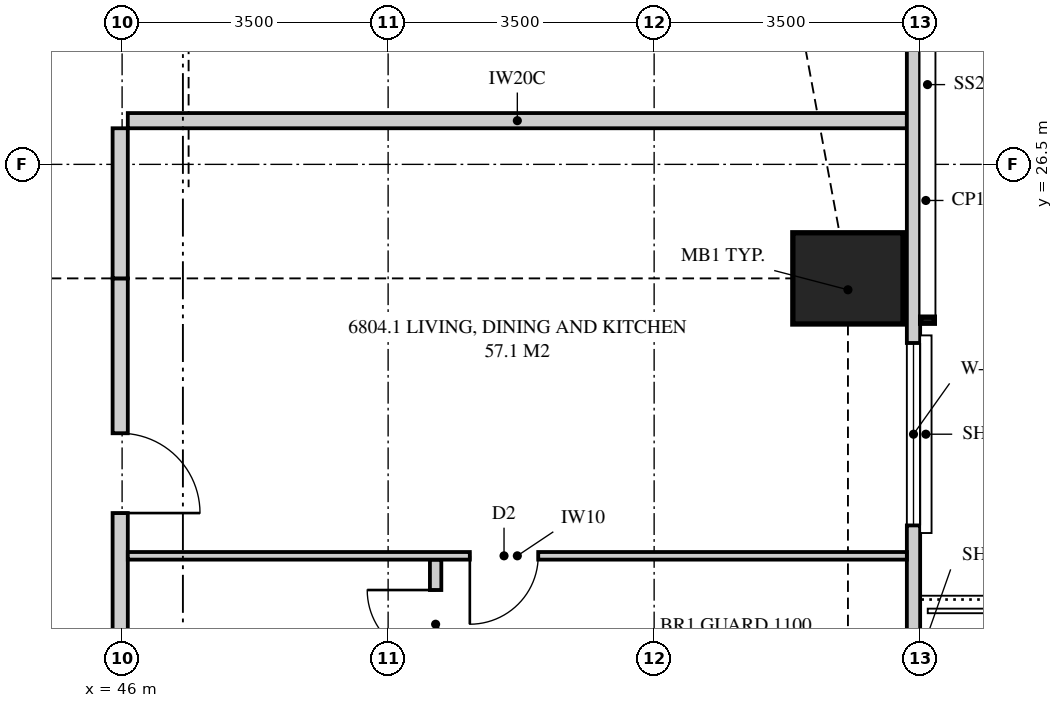
"""IFC4 building model, lengths in metres.
Left out: names, types, materials, properties, quantities, classifications, styles, units other than length and angle.
Written with IfcOpenShell. Run it as: python <this file> out.ifc"""

import sys

from ifc_helpers import new_model, si_unit, direction, frame, frame_2d, origin, origin_2d, place, context, subcontext, project, spatial, polyline, rectangle, outline, extrude, element, fill, save


model = new_model("IFC4")
c1 = context("Model", 3, precision=1e-05, world=origin(), true_north=direction((0.0, 1.0)))
c2 = subcontext(c1, "Body", "Model", "MODEL_VIEW")
j1 = project(units=[si_unit("LENGTHUNIT", "METRE"), si_unit("PLANEANGLEUNIT", "RADIAN")], contexts=[c1])
p1 = place(None, origin())
s1 = spatial("IfcSite", under=j1, at=p1, CompositionType="ELEMENT")
p2 = place(p1, origin())
s2 = spatial("IfcBuilding", under=s1, at=p2, CompositionType="ELEMENT")
p3 = place(p2, frame((0.0, 0.0, 249.45)))
s3 = spatial("IfcBuildingStorey", under=s2, at=p3, CompositionType="ELEMENT", Elevation=249.45)
p4 = place(p3, frame((55.55, 25.0, 0.0), z_axis=(0.0, 0.0, 1.0), x_axis=(1.0, 0.0, 0.0)))
e1 = element("IfcColumn", 1, at=p4, inside=s3, PredefinedType="COLUMN", context=c2, shape_type="SweptSolid", body=[
    extrude(rectangle(XDim=1.45, YDim=1.2, at=origin_2d()), origin(), (0.0, 0.0, 1.0), 3.5),
])
p5 = place(p3, frame((56.413, 3.051, 0.0), z_axis=(0.0, 0.0, 1.0), x_axis=(0.0, 1.0, 0.0)))
e2 = element("IfcWall", 2, at=p5, inside=s3, PredefinedType="SOLIDWALL", context=c2, shape_type="SweptSolid", body=[
    extrude(outline(polyline([(0.0, 0.0), (27.897, 0.0), (27.897, 3.26), (22.157, 3.26), (22.157, 2.3), (22.092, 2.3), (22.092, 3.26), (21.949, 3.26), (21.949, 2.3), (9.949, 2.3), (9.949, 3.26), (9.858, 3.26), (9.858, 2.3), (9.688, 2.3), (9.688, 3.26), (0.0, 3.26), (0.0, 0.0)])), frame((0.0, 0.087, 0.0), z_axis=(0.0, -1.0, 0.0), x_axis=(1.0, 0.0, 0.0)), (0.0, 0.0, 1.0), 0.175),
])
p6 = place(p5, frame((10.831, 0.0, 0.4)))
e3 = element("IfcOpeningElement", 3, at=p6, cuts=e2, PredefinedType="OPENING", context=c2, shape_type="SweptSolid", body=[
    extrude(rectangle(XDim=2.4, YDim=1.85, at=frame_2d((1.2, 0.925))), frame((0.0, 0.097, 0.0), z_axis=(0.0, -1.0, 0.0), x_axis=(1.0, 0.0, 0.0)), (0.0, 0.0, 1.0), 0.195),
])
p7 = place(p5, frame((15.074, 0.0, 0.0)))
e4 = element("IfcOpeningElement", 4, at=p7, cuts=e2, PredefinedType="OPENING", context=c2, shape_type="SweptSolid", body=[
    extrude(rectangle(XDim=1.8, YDim=2.25, at=frame_2d((0.9, 1.125))), frame((0.0, 0.097, 0.0), z_axis=(0.0, -1.0, 0.0), x_axis=(1.0, 0.0, 0.0)), (0.0, 0.0, 1.0), 0.195),
])
p8 = place(p5, frame((18.699, 0.0, 0.4)))
e5 = element("IfcOpeningElement", 5, at=p8, cuts=e2, PredefinedType="OPENING", context=c2, shape_type="SweptSolid", body=[
    extrude(rectangle(XDim=2.4, YDim=1.85, at=frame_2d((1.2, 0.925))), frame((0.0, 0.097, 0.0), z_axis=(0.0, -1.0, 0.0), x_axis=(1.0, 0.0, 0.0)), (0.0, 0.0, 1.0), 0.195),
])
p9 = place(p3, frame((46.075, 27.075, 0.0), z_axis=(0.0, 0.0, 1.0), x_axis=(1.0, 0.0, 0.0)))
e6 = element("IfcWall", 6, at=p9, inside=s3, PredefinedType="PARTITIONING", context=c2, shape_type="SweptSolid", body=[
    extrude(outline(polyline([(0.0, 0.0), (10.25, 0.0), (10.25, 3.26), (10.017, 3.26), (10.017, 2.3), (8.166, 2.3), (8.166, 3.26), (2.11, 3.26), (2.11, 2.66), (0.0, 2.66), (0.0, 3.26), (0.0, 0.0)])), frame((0.0, 0.1, 0.0), z_axis=(0.0, -1.0, 0.0), x_axis=(1.0, 0.0, 0.0)), (0.0, 0.0, 1.0), 0.2),
])
p10 = place(p3, frame((45.975, 17.85, 0.0), z_axis=(0.0, 0.0, 1.0), x_axis=(0.0, 1.0, 0.0)))
e7 = element("IfcWall", 7, at=p10, inside=s3, PredefinedType="PARTITIONING", context=c2, shape_type="SweptSolid", body=[
    extrude(outline(polyline([(0.0, 0.0), (7.15, 0.0), (7.15, 2.66), (5.84, 2.66), (5.84, 3.26), (2.21, 3.26), (2.21, 2.66), (0.0, 2.66), (0.0, 0.0)])), frame((0.0, 0.1, 0.0), z_axis=(0.0, -1.0, 0.0), x_axis=(1.0, 0.0, 0.0)), (0.0, 0.0, 1.0), 0.2),
])
p11 = place(p10, frame((4.062, 0.0, 0.0)))
e8 = element("IfcOpeningElement", 8, at=p11, cuts=e7, PredefinedType="OPENING", context=c2, shape_type="SweptSolid", body=[
    extrude(rectangle(XDim=1.05, YDim=2.2, at=frame_2d((0.525, 1.1))), frame((0.0, 0.11, 0.0), z_axis=(0.0, -1.0, 0.0), x_axis=(1.0, 0.0, 0.0)), (0.0, 0.0, 1.0), 0.22),
])
p12 = place(p3, frame((45.975, 25.0, 0.0), z_axis=(0.0, 0.0, 1.0), x_axis=(0.0, 1.0, 0.0)))
e9 = element("IfcWall", 9, at=p12, inside=s3, PredefinedType="PARTITIONING", context=c2, shape_type="SweptSolid", body=[
    extrude(rectangle(XDim=1.975, YDim=0.2, at=frame_2d((0.988, 0.0))), origin(), (0.0, 0.0, 1.0), 2.66),
])
p13 = place(p3, frame((56.325, 21.35, 0.0), z_axis=(0.0, 0.0, 1.0), x_axis=(-1.0, 0.0, 0.0)))
e10 = element("IfcWall", 10, at=p13, inside=s3, PredefinedType="PARTITIONING", context=c2, shape_type="SweptSolid", body=[
    extrude(outline(polyline([(0.0, 0.0), (10.25, 0.0), (10.25, 3.26), (1.635, 3.26), (1.635, 2.3), (0.0, 2.3), (0.0, 3.26), (0.0, 0.0)])), frame((0.0, 0.05, 0.0), z_axis=(0.0, -1.0, 0.0), x_axis=(1.0, 0.0, 0.0)), (0.0, 0.0, 1.0), 0.1),
])
p14 = place(p13, frame((4.85, 0.0, 0.0)))
e11 = element("IfcOpeningElement", 11, at=p14, cuts=e10, PredefinedType="OPENING", context=c2, shape_type="SweptSolid", body=[
    extrude(rectangle(XDim=0.9, YDim=2.1, at=frame_2d((0.45, 1.05))), frame((0.0, 0.06, 0.0), z_axis=(0.0, -1.0, 0.0), x_axis=(1.0, 0.0, 0.0)), (0.0, 0.0, 1.0), 0.12),
])
p15 = place(p3, frame((50.125, 17.85, 0.0), z_axis=(0.0, 0.0, 1.0), x_axis=(0.0, 1.0, 0.0)))
e12 = element("IfcWall", 12, at=p15, inside=s3, PredefinedType="PLUMBINGWALL", context=c2, shape_type="SweptSolid", body=[
    extrude(outline(polyline([(0.0, 0.0), (3.45, 0.0), (3.45, 3.26), (2.185, 3.26), (2.185, 2.66), (0.0, 2.66), (0.0, 3.26), (0.0, 0.0)])), frame((0.0, 0.075, 0.0), z_axis=(0.0, -1.0, 0.0), x_axis=(1.0, 0.0, 0.0)), (0.0, 0.0, 1.0), 0.15),
])
p16 = place(p15, frame((2.15, 0.0, 0.0)))
e13 = element("IfcOpeningElement", 13, at=p16, cuts=e12, PredefinedType="OPENING", context=c2, shape_type="SweptSolid", body=[
    extrude(rectangle(XDim=0.9, YDim=2.1, at=frame_2d((0.45, 1.05))), frame((0.0, 0.085, 0.0), z_axis=(0.0, -1.0, 0.0), x_axis=(1.0, 0.0, 0.0)), (0.0, 0.0, 1.0), 0.17),
])
p17 = place(p8, origin())
e14 = element("IfcWindow", 14, at=p17, inside=s3, PartitioningType="SINGLE_PANEL", PredefinedType="WINDOW", context=c2, shape_type="SweptSolid", body=[
    extrude(rectangle(XDim=2.4, YDim=1.85, at=frame_2d((1.2, 0.925))), frame((0.0, 0.03, 0.0), z_axis=(0.0, -1.0, 0.0), x_axis=(1.0, 0.0, 0.0)), (0.0, 0.0, 1.0), 0.06),
])
fill(e5, e14)
p18 = place(p11, frame((1.05, 0.0, 0.0), z_axis=(0.0, 0.0, 1.0), x_axis=(-1.0, 0.0, 0.0)))
e15 = element("IfcDoor", 15, at=p18, inside=s3, OperationType="SINGLE_SWING_RIGHT", PredefinedType="DOOR", context=c2, shape_type="SweptSolid", body=[
    extrude(rectangle(XDim=1.05, YDim=2.2, at=frame_2d((0.525, 1.1))), frame((0.0, 0.025, 0.0), z_axis=(0.0, -1.0, 0.0), x_axis=(1.0, 0.0, 0.0)), (0.0, 0.0, 1.0), 0.05),
])
fill(e8, e15)
p19 = place(p14, origin())
e16 = element("IfcDoor", 16, at=p19, inside=s3, OperationType="SINGLE_SWING_RIGHT", PredefinedType="DOOR", context=c2, shape_type="SweptSolid", body=[
    extrude(rectangle(XDim=0.9, YDim=2.1, at=frame_2d((0.45, 1.05))), frame((0.0, 0.025, 0.0), z_axis=(0.0, -1.0, 0.0), x_axis=(1.0, 0.0, 0.0)), (0.0, 0.0, 1.0), 0.05),
])
fill(e11, e16)
p20 = place(p16, origin())
e17 = element("IfcDoor", 17, at=p20, inside=s3, OperationType="SINGLE_SWING_RIGHT", PredefinedType="DOOR", context=c2, shape_type="SweptSolid", body=[
    extrude(rectangle(XDim=0.9, YDim=2.1, at=frame_2d((0.45, 1.05))), frame((0.0, 0.025, 0.0), z_axis=(0.0, -1.0, 0.0), x_axis=(1.0, 0.0, 0.0)), (0.0, 0.0, 1.0), 0.05),
])
fill(e13, e17)
save(model, sys.argv[1])
